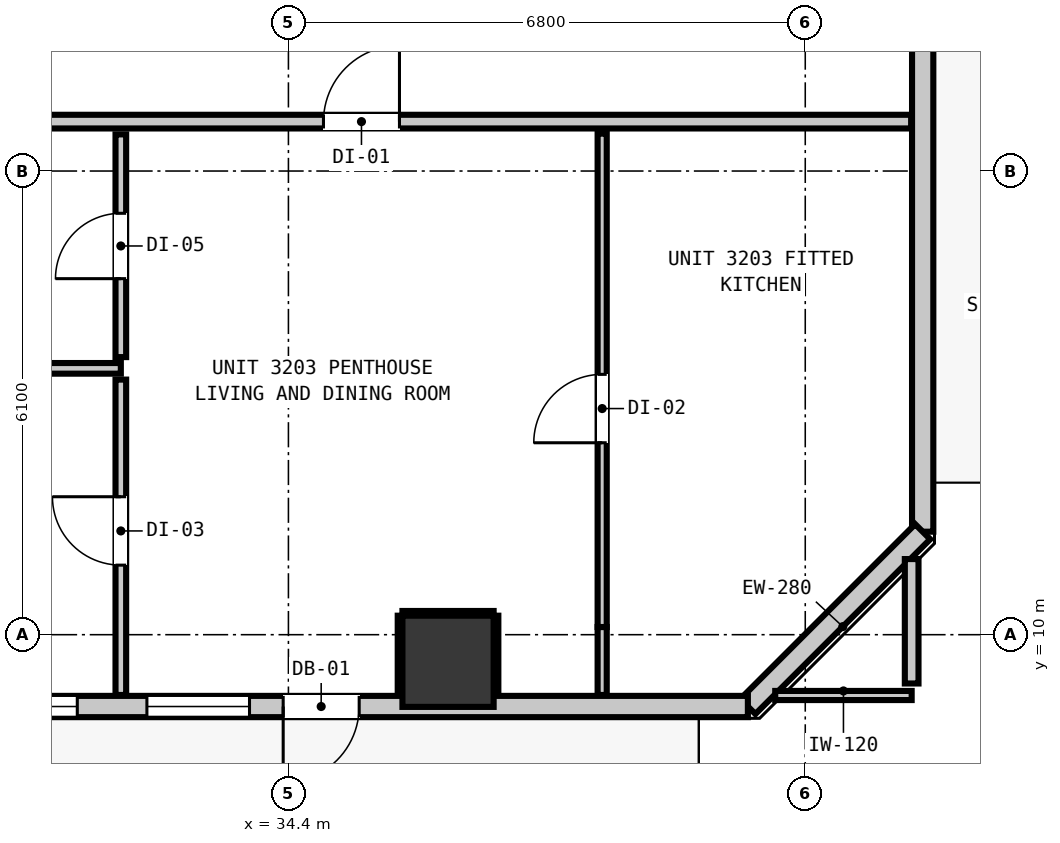
"""IFC4 building model, lengths in metres.
Left out: names, types, materials, properties, quantities, classifications, styles, units other than length and angle.
Written with IfcOpenShell. Run it as: python <this file> out.ifc"""

import sys

from ifc_helpers import new_model, si_unit, direction, frame, frame_2d, origin, origin_2d, place, context, subcontext, project, spatial, rectangle, extrude, element, fill, save


model = new_model("IFC4")
c1 = context("Model", 3, precision=1e-05, world=origin(), true_north=direction((0.0, 1.0)))
c2 = subcontext(c1, "Body", "Model", "MODEL_VIEW")
j1 = project(units=[si_unit("LENGTHUNIT", "METRE"), si_unit("PLANEANGLEUNIT", "RADIAN")], contexts=[c1])
p1 = place(None, origin())
s1 = spatial("IfcSite", under=j1, at=p1, CompositionType="ELEMENT")
p2 = place(p1, origin())
s2 = spatial("IfcBuilding", under=s1, at=p2, CompositionType="ELEMENT")
p3 = place(p2, frame((0.0, 0.0, 112.72)))
s3 = spatial("IfcBuildingStorey", under=s2, at=p3, CompositionType="ELEMENT", Elevation=112.72)
p4 = place(p3, frame((36.5, 9.65, 0.0), z_axis=(0.0, 0.0, 1.0), x_axis=(1.0, 0.0, 0.0)))
e1 = element("IfcColumn", 1, at=p4, inside=s3, PredefinedType="COLUMN", context=c2, shape_type="SweptSolid", body=[
    extrude(rectangle(XDim=1.2, YDim=1.2, at=origin_2d()), origin(), (0.0, 0.0, 1.0), 3.32),
])
p5 = place(p3, frame((42.745, 43.645, 0.0), z_axis=(0.0, 0.0, 1.0), x_axis=(0.0, -1.0, 0.0)))
e2 = element("IfcWall", 2, at=p5, inside=s3, PredefinedType="STANDARD", context=c2, shape_type="SweptSolid", body=[
    extrude(rectangle(XDim=32.29, YDim=0.28, at=frame_2d((16.145, 0.0))), origin(), (0.0, 0.0, 1.0), 3.08),
])
p6 = place(p5, frame((5.467, 0.0, 0.0)))
e3 = element("IfcOpeningElement", 3, at=p6, cuts=e2, PredefinedType="OPENING", context=c2, shape_type="SweptSolid", body=[
    extrude(rectangle(XDim=1.0, YDim=2.15, at=frame_2d((0.5, 1.075))), frame((0.0, 0.15, 0.0), z_axis=(0.0, -1.0, 0.0), x_axis=(1.0, 0.0, 0.0)), (0.0, 0.0, 1.0), 0.3),
])
p7 = place(p5, frame((0.318, 0.0, 0.85)))
e4 = element("IfcOpeningElement", 4, at=p7, cuts=e2, PredefinedType="OPENING", context=c2, shape_type="SweptSolid", body=[
    extrude(rectangle(XDim=1.05, YDim=1.65, at=frame_2d((0.525, 0.825))), frame((0.0, 0.15, 0.0), z_axis=(0.0, -1.0, 0.0), x_axis=(1.0, 0.0, 0.0)), (0.0, 0.0, 1.0), 0.3),
])
p8 = place(p5, frame((14.648, 0.0, 0.85)))
e5 = element("IfcOpeningElement", 5, at=p8, cuts=e2, PredefinedType="OPENING", context=c2, shape_type="SweptSolid", body=[
    extrude(rectangle(XDim=1.35, YDim=1.85, at=frame_2d((0.675, 0.925))), frame((0.0, 0.15, 0.0), z_axis=(0.0, -1.0, 0.0), x_axis=(1.0, 0.0, 0.0)), (0.0, 0.0, 1.0), 0.3),
])
p9 = place(p3, frame((42.745, 11.355, 0.0), z_axis=(0.0, 0.0, 1.0), x_axis=(-0.707106781187, -0.707106781187, 0.0)))
e6 = element("IfcWall", 6, at=p9, inside=s3, PredefinedType="STANDARD", context=c2, shape_type="SweptSolid", body=[
    extrude(rectangle(XDim=3.253, YDim=0.28, at=frame_2d((1.626, 0.0))), origin(), (0.0, 0.0, 1.0), 3.08),
])
p10 = place(p3, frame((40.445, 9.055, 0.0), z_axis=(0.0, 0.0, 1.0), x_axis=(-1.0, 0.0, 0.0)))
e7 = element("IfcWall", 7, at=p10, inside=s3, PredefinedType="STANDARD", context=c2, shape_type="SweptSolid", body=[
    extrude(rectangle(XDim=35.09, YDim=0.28, at=frame_2d((17.545, 0.0))), origin(), (0.0, 0.0, 1.0), 3.08),
])
p11 = place(p10, frame((5.114, 0.0, 0.0)))
e8 = element("IfcOpeningElement", 8, at=p11, cuts=e7, PredefinedType="OPENING", context=c2, shape_type="SweptSolid", body=[
    extrude(rectangle(XDim=1.0, YDim=2.15, at=frame_2d((0.5, 1.075))), frame((0.0, 0.15, 0.0), z_axis=(0.0, -1.0, 0.0), x_axis=(1.0, 0.0, 0.0)), (0.0, 0.0, 1.0), 0.3),
])
p12 = place(p10, frame((31.752, 0.0, 0.85)))
e9 = element("IfcOpeningElement", 9, at=p12, cuts=e7, PredefinedType="OPENING", context=c2, shape_type="SweptSolid", body=[
    extrude(rectangle(XDim=1.35, YDim=1.85, at=frame_2d((0.675, 0.925))), frame((0.0, 0.15, 0.0), z_axis=(0.0, -1.0, 0.0), x_axis=(1.0, 0.0, 0.0)), (0.0, 0.0, 1.0), 0.3),
])
p13 = place(p10, frame((34.198, 0.0, 0.85)))
e10 = element("IfcOpeningElement", 10, at=p13, cuts=e7, PredefinedType="OPENING", context=c2, shape_type="SweptSolid", body=[
    extrude(rectangle(XDim=0.58, YDim=1.5, at=frame_2d((0.29, 0.75))), frame((0.0, 0.15, 0.0), z_axis=(0.0, -1.0, 0.0), x_axis=(1.0, 0.0, 0.0)), (0.0, 0.0, 1.0), 0.3),
])
p14 = place(p10, frame((21.39, 0.0, 0.85)))
e11 = element("IfcOpeningElement", 11, at=p14, cuts=e7, PredefinedType="OPENING", context=c2, shape_type="SweptSolid", body=[
    extrude(rectangle(XDim=1.35, YDim=1.85, at=frame_2d((0.675, 0.925))), frame((0.0, 0.15, 0.0), z_axis=(0.0, -1.0, 0.0), x_axis=(1.0, 0.0, 0.0)), (0.0, 0.0, 1.0), 0.3),
])
p15 = place(p10, frame((24.59, 0.0, 0.85)))
e12 = element("IfcOpeningElement", 12, at=p15, cuts=e7, PredefinedType="OPENING", context=c2, shape_type="SweptSolid", body=[
    extrude(rectangle(XDim=1.35, YDim=1.85, at=frame_2d((0.675, 0.925))), frame((0.0, 0.15, 0.0), z_axis=(0.0, -1.0, 0.0), x_axis=(1.0, 0.0, 0.0)), (0.0, 0.0, 1.0), 0.3),
])
p16 = place(p10, frame((14.699, 0.0, 0.85)))
e13 = element("IfcOpeningElement", 13, at=p16, cuts=e7, PredefinedType="OPENING", context=c2, shape_type="SweptSolid", body=[
    extrude(rectangle(XDim=1.35, YDim=1.85, at=frame_2d((0.675, 0.925))), frame((0.0, 0.15, 0.0), z_axis=(0.0, -1.0, 0.0), x_axis=(1.0, 0.0, 0.0)), (0.0, 0.0, 1.0), 0.3),
])
p17 = place(p10, frame((6.557, 0.0, 0.85)))
e14 = element("IfcOpeningElement", 14, at=p17, cuts=e7, PredefinedType="OPENING", context=c2, shape_type="SweptSolid", body=[
    extrude(rectangle(XDim=1.35, YDim=1.85, at=frame_2d((0.675, 0.925))), frame((0.0, 0.15, 0.0), z_axis=(0.0, -1.0, 0.0), x_axis=(1.0, 0.0, 0.0)), (0.0, 0.0, 1.0), 0.3),
])
p18 = place(p10, frame((8.823, 0.0, 0.85)))
e15 = element("IfcOpeningElement", 15, at=p18, cuts=e7, PredefinedType="OPENING", context=c2, shape_type="SweptSolid", body=[
    extrude(rectangle(XDim=1.35, YDim=1.85, at=frame_2d((0.675, 0.925))), frame((0.0, 0.15, 0.0), z_axis=(0.0, -1.0, 0.0), x_axis=(1.0, 0.0, 0.0)), (0.0, 0.0, 1.0), 0.3),
])
p19 = place(p3, frame((3.207, 16.75, 0.0), z_axis=(0.0, 0.0, 1.0), x_axis=(1.0, 0.0, 0.0)))
e16 = element("IfcWall", 16, at=p19, inside=s3, PredefinedType="PARTITIONING", context=c2, shape_type="SweptSolid", body=[
    extrude(rectangle(XDim=39.386, YDim=0.18, at=frame_2d((19.693, 0.0))), origin(), (0.0, 0.0, 1.0), 3.08),
])
p20 = place(p19, frame((4.311, 0.0, 0.0)))
e17 = element("IfcOpeningElement", 17, at=p20, cuts=e16, PredefinedType="OPENING", context=c2, shape_type="SweptSolid", body=[
    extrude(rectangle(XDim=1.0, YDim=2.15, at=frame_2d((0.5, 1.075))), frame((0.0, 0.1, 0.0), z_axis=(0.0, -1.0, 0.0), x_axis=(1.0, 0.0, 0.0)), (0.0, 0.0, 1.0), 0.2),
])
p21 = place(p19, frame((15.834, 0.0, 0.0)))
e18 = element("IfcOpeningElement", 18, at=p21, cuts=e16, PredefinedType="OPENING", context=c2, shape_type="SweptSolid", body=[
    extrude(rectangle(XDim=1.0, YDim=2.15, at=frame_2d((0.5, 1.075))), frame((0.0, 0.1, 0.0), z_axis=(0.0, -1.0, 0.0), x_axis=(1.0, 0.0, 0.0)), (0.0, 0.0, 1.0), 0.2),
])
p22 = place(p19, frame((31.654, 0.0, 0.0)))
e19 = element("IfcOpeningElement", 19, at=p22, cuts=e16, PredefinedType="OPENING", context=c2, shape_type="SweptSolid", body=[
    extrude(rectangle(XDim=1.0, YDim=2.15, at=frame_2d((0.5, 1.075))), frame((0.0, 0.1, 0.0), z_axis=(0.0, -1.0, 0.0), x_axis=(1.0, 0.0, 0.0)), (0.0, 0.0, 1.0), 0.2),
])
p23 = place(p3, frame((22.622, 13.504, 0.0), z_axis=(0.0, 0.0, 1.0), x_axis=(1.0, 0.0, 0.0)))
e20 = element("IfcWall", 20, at=p23, inside=s3, PredefinedType="PARTITIONING", context=c2, shape_type="SweptSolid", body=[
    extrude(rectangle(XDim=9.573, YDim=0.14, at=frame_2d((4.787, 0.0))), origin(), (0.0, 0.0, 1.0), 3.08),
])
p24 = place(p3, frame((40.805, 9.2, 0.0), z_axis=(0.0, 0.0, 1.0), x_axis=(1.0, 0.0, 0.0)))
e21 = element("IfcWall", 21, at=p24, inside=s3, PredefinedType="PARTITIONING", context=c2, shape_type="SweptSolid", body=[
    extrude(rectangle(XDim=1.795, YDim=0.12, at=frame_2d((0.897, 0.0))), origin(), (0.0, 0.0, 1.0), 3.08),
])
p25 = place(p3, frame((42.6, 9.358, 0.0), z_axis=(0.0, 0.0, 1.0), x_axis=(0.0, 1.0, 0.0)))
e22 = element("IfcWall", 22, at=p25, inside=s3, PredefinedType="PARTITIONING", context=c2, shape_type="SweptSolid", body=[
    extrude(rectangle(XDim=1.637, YDim=0.18, at=frame_2d((0.819, 0.0))), origin(), (0.0, 0.0, 1.0), 3.08),
])
p26 = place(p3, frame((32.195, 9.207, 0.0), z_axis=(0.0, 0.0, 1.0), x_axis=(0.0, 1.0, 0.0)))
e23 = element("IfcWall", 23, at=p26, inside=s3, PredefinedType="PARTITIONING", context=c2, shape_type="SweptSolid", body=[
    extrude(rectangle(XDim=4.149, YDim=0.14, at=frame_2d((2.074, 0.0))), origin(), (0.0, 0.0, 1.0), 3.08),
])
p27 = place(p26, frame((1.708, 0.0, 0.0)))
e24 = element("IfcOpeningElement", 24, at=p27, cuts=e23, PredefinedType="OPENING", context=c2, shape_type="SweptSolid", body=[
    extrude(rectangle(XDim=0.9, YDim=2.1, at=frame_2d((0.45, 1.05))), frame((0.0, 0.08, 0.0), z_axis=(0.0, -1.0, 0.0), x_axis=(1.0, 0.0, 0.0)), (0.0, 0.0, 1.0), 0.16),
])
p28 = place(p3, frame((32.195, 13.652, 0.0), z_axis=(0.0, 0.0, 1.0), x_axis=(0.0, 1.0, 0.0)))
e25 = element("IfcWall", 25, at=p28, inside=s3, PredefinedType="PARTITIONING", context=c2, shape_type="SweptSolid", body=[
    extrude(rectangle(XDim=2.93, YDim=0.14, at=frame_2d((1.465, 0.0))), origin(), (0.0, 0.0, 1.0), 3.08),
])
p29 = place(p28, frame((1.032, 0.0, 0.0)))
e26 = element("IfcOpeningElement", 26, at=p29, cuts=e25, PredefinedType="OPENING", context=c2, shape_type="SweptSolid", body=[
    extrude(rectangle(XDim=0.86, YDim=2.02, at=frame_2d((0.43, 1.01))), frame((0.0, 0.08, 0.0), z_axis=(0.0, -1.0, 0.0), x_axis=(1.0, 0.0, 0.0)), (0.0, 0.0, 1.0), 0.16),
])
p30 = place(p3, frame((38.528, 9.207, 0.0), z_axis=(0.0, 0.0, 1.0), x_axis=(0.0, 1.0, 0.0)))
e27 = element("IfcWall", 27, at=p30, inside=s3, PredefinedType="PARTITIONING", context=c2, shape_type="SweptSolid", body=[
    extrude(rectangle(XDim=0.894, YDim=0.12, at=frame_2d((0.447, 0.0))), origin(), (0.0, 0.0, 1.0), 3.08),
])
p31 = place(p3, frame((38.528, 10.101, 0.0), z_axis=(0.0, 0.0, 1.0), x_axis=(0.0, 1.0, 0.0)))
e28 = element("IfcWall", 28, at=p31, inside=s3, PredefinedType="PARTITIONING", context=c2, shape_type="SweptSolid", body=[
    extrude(rectangle(XDim=6.491, YDim=0.12, at=frame_2d((3.246, 0.0))), origin(), (0.0, 0.0, 1.0), 2.565),
])
p32 = place(p31, frame((2.424, 0.0, 0.0)))
e29 = element("IfcOpeningElement", 29, at=p32, cuts=e28, PredefinedType="OPENING", context=c2, shape_type="SweptSolid", body=[
    extrude(rectangle(XDim=0.9, YDim=2.1, at=frame_2d((0.45, 1.05))), frame((0.0, 0.07, 0.0), z_axis=(0.0, -1.0, 0.0), x_axis=(1.0, 0.0, 0.0)), (0.0, 0.0, 1.0), 0.14),
])
p33 = place(p3, frame((35.9, 10.282, 0.0), z_axis=(0.0, 0.0, 1.0), x_axis=(1.0, 0.0, 0.0)))
e30 = element("IfcWall", 30, at=p33, inside=s3, PredefinedType="PARTITIONING", context=c2, shape_type="SweptSolid", body=[
    extrude(rectangle(XDim=1.2, YDim=0.06, at=frame_2d((0.6, 0.0))), origin(), (0.0, 0.0, 1.0), 1.45),
])
for number, where, z_axis, x_axis in (
    (31, (35.868, 9.21, 0.0), (0.0, 0.0, 1.0), (0.0, 1.0, 0.0)),
    (32, (37.132, 9.21, 0.0), (0.0, 0.0, 1.0), (0.0, 1.0, 0.0)),
):
    element("IfcWall", number, at=place(p3, frame(where, z_axis=z_axis, x_axis=x_axis)), inside=s3, PredefinedType="PARTITIONING", context=c2, shape_type="SweptSolid", body=[
        extrude(rectangle(XDim=1.04, YDim=0.06, at=frame_2d((0.52, 0.0))), origin(), (0.0, 0.0, 1.0), 1.45),
    ])
p34 = place(p11, origin())
e33 = element("IfcDoor", 33, at=p34, inside=s3, OperationType="SINGLE_SWING_RIGHT", PredefinedType="DOOR", context=c2, shape_type="SweptSolid", body=[
    extrude(rectangle(XDim=1.0, YDim=2.15, at=frame_2d((0.5, 1.075))), frame((0.0, 0.025, 0.0), z_axis=(0.0, -1.0, 0.0), x_axis=(1.0, 0.0, 0.0)), (0.0, 0.0, 1.0), 0.05),
])
fill(e8, e33)
p35 = place(p17, origin())
e34 = element("IfcWindow", 34, at=p35, inside=s3, PartitioningType="SINGLE_PANEL", PredefinedType="WINDOW", context=c2, shape_type="SweptSolid", body=[
    extrude(rectangle(XDim=1.35, YDim=1.85, at=frame_2d((0.675, 0.925))), frame((0.0, 0.03, 0.0), z_axis=(0.0, -1.0, 0.0), x_axis=(1.0, 0.0, 0.0)), (0.0, 0.0, 1.0), 0.06),
])
fill(e14, e34)
p36 = place(p18, origin())
e35 = element("IfcWindow", 35, at=p36, inside=s3, PartitioningType="SINGLE_PANEL", PredefinedType="WINDOW", context=c2, shape_type="SweptSolid", body=[
    extrude(rectangle(XDim=1.35, YDim=1.85, at=frame_2d((0.675, 0.925))), frame((0.0, 0.03, 0.0), z_axis=(0.0, -1.0, 0.0), x_axis=(1.0, 0.0, 0.0)), (0.0, 0.0, 1.0), 0.06),
])
fill(e15, e35)
p37 = place(p22, origin())
e36 = element("IfcDoor", 36, at=p37, inside=s3, OperationType="SINGLE_SWING_RIGHT", PredefinedType="DOOR", context=c2, shape_type="SweptSolid", body=[
    extrude(rectangle(XDim=1.0, YDim=2.15, at=frame_2d((0.5, 1.075))), frame((0.0, 0.025, 0.0), z_axis=(0.0, -1.0, 0.0), x_axis=(1.0, 0.0, 0.0)), (0.0, 0.0, 1.0), 0.05),
])
fill(e19, e36)
p38 = place(p29, origin())
e37 = element("IfcDoor", 37, at=p38, inside=s3, OperationType="SINGLE_SWING_LEFT", PredefinedType="DOOR", context=c2, shape_type="SweptSolid", body=[
    extrude(rectangle(XDim=0.86, YDim=2.02, at=frame_2d((0.43, 1.01))), frame((0.0, 0.025, 0.0), z_axis=(0.0, -1.0, 0.0), x_axis=(1.0, 0.0, 0.0)), (0.0, 0.0, 1.0), 0.05),
])
fill(e26, e37)
p39 = place(p27, origin())
e38 = element("IfcDoor", 38, at=p39, inside=s3, OperationType="SINGLE_SWING_RIGHT", PredefinedType="DOOR", context=c2, shape_type="SweptSolid", body=[
    extrude(rectangle(XDim=0.9, YDim=2.1, at=frame_2d((0.45, 1.05))), frame((0.0, 0.025, 0.0), z_axis=(0.0, -1.0, 0.0), x_axis=(1.0, 0.0, 0.0)), (0.0, 0.0, 1.0), 0.05),
])
fill(e24, e38)
p40 = place(p32, origin())
e39 = element("IfcDoor", 39, at=p40, inside=s3, OperationType="SINGLE_SWING_LEFT", PredefinedType="DOOR", context=c2, shape_type="SweptSolid", body=[
    extrude(rectangle(XDim=0.9, YDim=2.1, at=frame_2d((0.45, 1.05))), frame((0.0, 0.025, 0.0), z_axis=(0.0, -1.0, 0.0), x_axis=(1.0, 0.0, 0.0)), (0.0, 0.0, 1.0), 0.05),
])
fill(e29, e39)
save(model, sys.argv[1])
